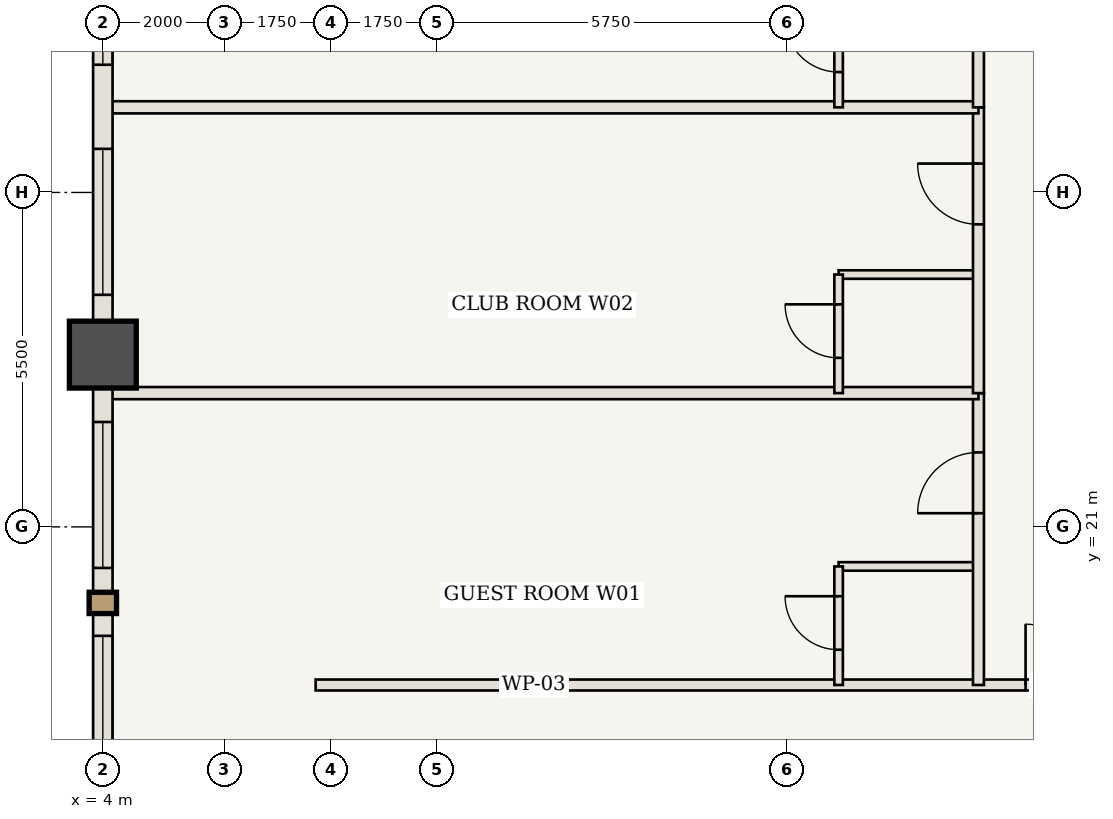
"""IFC4 building model, lengths in metres.
Left out: names, types, materials, properties, quantities, classifications, styles, units other than length and angle.
Written with IfcOpenShell. Run it as: python <this file> out.ifc"""

import sys

from ifc_helpers import new_model, si_unit, direction, frame, frame_2d, origin, origin_2d, place, context, subcontext, project, spatial, rectangle, extrude, element, fill, save


model = new_model("IFC4")
c1 = context("Model", 3, precision=1e-05, world=origin(), true_north=direction((0.0, 1.0)))
c2 = subcontext(c1, "Body", "Model", "MODEL_VIEW")
j1 = project(units=[si_unit("LENGTHUNIT", "METRE"), si_unit("PLANEANGLEUNIT", "RADIAN")], contexts=[c1])
p1 = place(None, origin())
s1 = spatial("IfcSite", under=j1, at=p1, CompositionType="ELEMENT")
p2 = place(p1, origin())
s2 = spatial("IfcBuilding", under=s1, at=p2, CompositionType="ELEMENT")
p3 = place(p2, frame((0.0, 0.0, 42.35)))
s3 = spatial("IfcBuildingStorey", under=s2, at=p3, CompositionType="ELEMENT", Elevation=42.35)
p4 = place(p3, frame((4.0, 23.833, 0.0), z_axis=(0.0, 0.0, 1.0), x_axis=(1.0, 0.0, 0.0)))
e1 = element("IfcColumn", 1, at=p4, inside=s3, PredefinedType="COLUMN", context=c2, shape_type="SweptSolid", body=[
    extrude(rectangle(XDim=1.1, YDim=1.1, at=origin_2d()), origin(), (0.0, 0.0, 1.0), 3.5),
])
p5 = place(p3, frame((7.5, 18.4, 0.0), z_axis=(0.0, 0.0, 1.0), x_axis=(1.0, 0.0, 0.0)))
e2 = element("IfcWall", 2, at=p5, inside=s3, PredefinedType="STANDARD", context=c2, shape_type="SweptSolid", body=[
    extrude(rectangle(XDim=16.3, YDim=0.18, at=frame_2d((8.15, 0.0))), origin(), (0.0, 0.0, 1.0), 3.32),
])
p6 = place(p5, frame((11.675, 0.0, 0.0)))
e3 = element("IfcOpeningElement", 3, at=p6, cuts=e2, PredefinedType="OPENING", context=c2, shape_type="SweptSolid", body=[
    extrude(rectangle(XDim=1.0, YDim=2.15, at=frame_2d((0.5, 1.075))), frame((0.0, 0.1, 0.0), z_axis=(0.0, -1.0, 0.0), x_axis=(1.0, 0.0, 0.0)), (0.0, 0.0, 1.0), 0.2),
])
p7 = place(p3, frame((16.1, 20.35, 0.0), z_axis=(0.0, 0.0, 1.0), x_axis=(1.0, 0.0, 0.0)))
e4 = element("IfcWall", 4, at=p7, inside=s3, PredefinedType="STANDARD", context=c2, shape_type="SweptSolid", body=[
    extrude(rectangle(XDim=2.3, YDim=0.14, at=frame_2d((1.15, 0.0))), origin(), (0.0, 0.0, 1.0), 3.32),
])
p8 = place(p3, frame((16.1, 18.4, 0.0), z_axis=(0.0, 0.0, 1.0), x_axis=(0.0, 1.0, 0.0)))
e5 = element("IfcWall", 5, at=p8, inside=s3, PredefinedType="STANDARD", context=c2, shape_type="SweptSolid", body=[
    extrude(rectangle(XDim=1.95, YDim=0.14, at=frame_2d((0.975, 0.0))), origin(), (0.0, 0.0, 1.0), 3.32),
])
p9 = place(p8, frame((0.58, 0.0, 0.0)))
e6 = element("IfcOpeningElement", 6, at=p9, cuts=e5, PredefinedType="OPENING", context=c2, shape_type="SweptSolid", body=[
    extrude(rectangle(XDim=0.88, YDim=2.1, at=frame_2d((0.44, 1.05))), frame((0.0, 0.08, 0.0), z_axis=(0.0, -1.0, 0.0), x_axis=(1.0, 0.0, 0.0)), (0.0, 0.0, 1.0), 0.16),
])
p10 = place(p3, frame((18.4, 18.4, 0.0), z_axis=(0.0, 0.0, 1.0), x_axis=(0.0, 1.0, 0.0)))
e7 = element("IfcWall", 7, at=p10, inside=s3, PredefinedType="STANDARD", context=c2, shape_type="SweptSolid", body=[
    extrude(rectangle(XDim=4.8, YDim=0.18, at=frame_2d((2.4, 0.0))), origin(), (0.0, 0.0, 1.0), 3.32),
])
p11 = place(p10, frame((2.825, 0.0, 0.0)))
e8 = element("IfcOpeningElement", 8, at=p11, cuts=e7, PredefinedType="OPENING", context=c2, shape_type="SweptSolid", body=[
    extrude(rectangle(XDim=1.0, YDim=2.15, at=frame_2d((0.5, 1.075))), frame((0.0, 0.1, 0.0), z_axis=(0.0, -1.0, 0.0), x_axis=(1.0, 0.0, 0.0)), (0.0, 0.0, 1.0), 0.2),
])
p12 = place(p3, frame((4.06, 23.2, 0.0), z_axis=(0.0, 0.0, 1.0), x_axis=(1.0, 0.0, 0.0)))
e9 = element("IfcWall", 9, at=p12, inside=s3, PredefinedType="STANDARD", context=c2, shape_type="SweptSolid", body=[
    extrude(rectangle(XDim=14.34, YDim=0.2, at=frame_2d((7.17, 0.0))), origin(), (0.0, 0.0, 1.0), 3.32),
])
p13 = place(p3, frame((16.1, 25.15, 0.0), z_axis=(0.0, 0.0, 1.0), x_axis=(1.0, 0.0, 0.0)))
e10 = element("IfcWall", 10, at=p13, inside=s3, PredefinedType="STANDARD", context=c2, shape_type="SweptSolid", body=[
    extrude(rectangle(XDim=2.3, YDim=0.14, at=frame_2d((1.15, 0.0))), origin(), (0.0, 0.0, 1.0), 3.32),
])
p14 = place(p3, frame((16.1, 23.2, 0.0), z_axis=(0.0, 0.0, 1.0), x_axis=(0.0, 1.0, 0.0)))
e11 = element("IfcWall", 11, at=p14, inside=s3, PredefinedType="STANDARD", context=c2, shape_type="SweptSolid", body=[
    extrude(rectangle(XDim=1.95, YDim=0.14, at=frame_2d((0.975, 0.0))), origin(), (0.0, 0.0, 1.0), 3.32),
])
p15 = place(p14, frame((0.58, 0.0, 0.0)))
e12 = element("IfcOpeningElement", 12, at=p15, cuts=e11, PredefinedType="OPENING", context=c2, shape_type="SweptSolid", body=[
    extrude(rectangle(XDim=0.88, YDim=2.1, at=frame_2d((0.44, 1.05))), frame((0.0, 0.08, 0.0), z_axis=(0.0, -1.0, 0.0), x_axis=(1.0, 0.0, 0.0)), (0.0, 0.0, 1.0), 0.16),
])
p16 = place(p3, frame((18.4, 23.2, 0.0), z_axis=(0.0, 0.0, 1.0), x_axis=(0.0, 1.0, 0.0)))
e13 = element("IfcWall", 13, at=p16, inside=s3, PredefinedType="STANDARD", context=c2, shape_type="SweptSolid", body=[
    extrude(rectangle(XDim=4.7, YDim=0.18, at=frame_2d((2.35, 0.0))), origin(), (0.0, 0.0, 1.0), 3.32),
])
p17 = place(p16, frame((2.775, 0.0, 0.0)))
e14 = element("IfcOpeningElement", 14, at=p17, cuts=e13, PredefinedType="OPENING", context=c2, shape_type="SweptSolid", body=[
    extrude(rectangle(XDim=1.0, YDim=2.15, at=frame_2d((0.5, 1.075))), frame((0.0, 0.1, 0.0), z_axis=(0.0, -1.0, 0.0), x_axis=(1.0, 0.0, 0.0)), (0.0, 0.0, 1.0), 0.2),
])
p18 = place(p3, frame((4.06, 27.9, 0.0), z_axis=(0.0, 0.0, 1.0), x_axis=(1.0, 0.0, 0.0)))
e15 = element("IfcWall", 15, at=p18, inside=s3, PredefinedType="STANDARD", context=c2, shape_type="SweptSolid", body=[
    extrude(rectangle(XDim=14.34, YDim=0.2, at=frame_2d((7.17, 0.0))), origin(), (0.0, 0.0, 1.0), 3.32),
])
p19 = place(p3, frame((16.1, 27.9, 0.0), z_axis=(0.0, 0.0, 1.0), x_axis=(0.0, 1.0, 0.0)))
e16 = element("IfcWall", 16, at=p19, inside=s3, PredefinedType="STANDARD", context=c2, shape_type="SweptSolid", body=[
    extrude(rectangle(XDim=1.95, YDim=0.14, at=frame_2d((0.975, 0.0))), origin(), (0.0, 0.0, 1.0), 3.32),
])
p20 = place(p19, frame((0.58, 0.0, 0.0)))
e17 = element("IfcOpeningElement", 17, at=p20, cuts=e16, PredefinedType="OPENING", context=c2, shape_type="SweptSolid", body=[
    extrude(rectangle(XDim=0.88, YDim=2.1, at=frame_2d((0.44, 1.05))), frame((0.0, 0.08, 0.0), z_axis=(0.0, -1.0, 0.0), x_axis=(1.0, 0.0, 0.0)), (0.0, 0.0, 1.0), 0.16),
])
p21 = place(p3, frame((18.4, 27.9, 0.0), z_axis=(0.0, 0.0, 1.0), x_axis=(0.0, 1.0, 0.0)))
e18 = element("IfcWall", 18, at=p21, inside=s3, PredefinedType="STANDARD", context=c2, shape_type="SweptSolid", body=[
    extrude(rectangle(XDim=4.7, YDim=0.18, at=frame_2d((2.35, 0.0))), origin(), (0.0, 0.0, 1.0), 3.32),
])
p22 = place(p21, frame((2.775, 0.0, 0.0)))
e19 = element("IfcOpeningElement", 19, at=p22, cuts=e18, PredefinedType="OPENING", context=c2, shape_type="SweptSolid", body=[
    extrude(rectangle(XDim=1.0, YDim=2.15, at=frame_2d((0.5, 1.075))), frame((0.0, 0.1, 0.0), z_axis=(0.0, -1.0, 0.0), x_axis=(1.0, 0.0, 0.0)), (0.0, 0.0, 1.0), 0.2),
])
p23 = place(p3, frame((4.0, 15.667, 0.0), z_axis=(0.0, 0.0, 1.0), x_axis=(0.0, 1.0, 0.0)))
e20 = element("IfcWall", 20, at=p23, inside=s3, PredefinedType="USERDEFINED", context=c2, shape_type="SweptSolid", body=[
    extrude(rectangle(XDim=8.167, YDim=0.32, at=frame_2d((4.083, 0.0))), origin(), (0.0, 0.0, 1.0), 2.52),
])
p24 = place(p23, frame((0.742, 0.0, 0.85)))
e21 = element("IfcOpeningElement", 21, at=p24, cuts=e20, PredefinedType="OPENING", context=c2, shape_type="SweptSolid", body=[
    extrude(rectangle(XDim=2.8, YDim=1.47, at=frame_2d((1.4, 0.735))), frame((0.0, 0.17, 0.0), z_axis=(0.0, -1.0, 0.0), x_axis=(1.0, 0.0, 0.0)), (0.0, 0.0, 1.0), 0.34),
])
p25 = place(p23, frame((4.658, 0.0, 0.85)))
e22 = element("IfcOpeningElement", 22, at=p25, cuts=e20, PredefinedType="OPENING", context=c2, shape_type="SweptSolid", body=[
    extrude(rectangle(XDim=2.4, YDim=1.47, at=frame_2d((1.2, 0.735))), frame((0.0, 0.17, 0.0), z_axis=(0.0, -1.0, 0.0), x_axis=(1.0, 0.0, 0.0)), (0.0, 0.0, 1.0), 0.34),
])
p26 = place(p3, frame((4.0, 23.833, 0.0), z_axis=(0.0, 0.0, 1.0), x_axis=(0.0, 1.0, 0.0)))
e23 = element("IfcWall", 23, at=p26, inside=s3, PredefinedType="USERDEFINED", context=c2, shape_type="SweptSolid", body=[
    extrude(rectangle(XDim=8.167, YDim=0.32, at=frame_2d((4.083, 0.0))), origin(), (0.0, 0.0, 1.0), 2.52),
])
p27 = place(p26, frame((0.983, 0.0, 0.85)))
e24 = element("IfcOpeningElement", 24, at=p27, cuts=e23, PredefinedType="OPENING", context=c2, shape_type="SweptSolid", body=[
    extrude(rectangle(XDim=2.4, YDim=1.47, at=frame_2d((1.2, 0.735))), frame((0.0, 0.17, 0.0), z_axis=(0.0, -1.0, 0.0), x_axis=(1.0, 0.0, 0.0)), (0.0, 0.0, 1.0), 0.34),
])
p28 = place(p26, frame((4.767, 0.0, 0.85)))
e25 = element("IfcOpeningElement", 25, at=p28, cuts=e23, PredefinedType="OPENING", context=c2, shape_type="SweptSolid", body=[
    extrude(rectangle(XDim=2.4, YDim=1.47, at=frame_2d((1.2, 0.735))), frame((0.0, 0.17, 0.0), z_axis=(0.0, -1.0, 0.0), x_axis=(1.0, 0.0, 0.0)), (0.0, 0.0, 1.0), 0.34),
])
p29 = place(p6, origin())
e26 = element("IfcDoor", 26, at=p29, inside=s3, OperationType="SINGLE_SWING_LEFT", PredefinedType="DOOR", context=c2, shape_type="SweptSolid", body=[
    extrude(rectangle(XDim=1.0, YDim=2.15, at=frame_2d((0.5, 1.075))), frame((0.0, 0.025, 0.0), z_axis=(0.0, -1.0, 0.0), x_axis=(1.0, 0.0, 0.0)), (0.0, 0.0, 1.0), 0.05),
])
fill(e3, e26)
p30 = place(p9, origin())
e27 = element("IfcDoor", 27, at=p30, inside=s3, OperationType="SINGLE_SWING_RIGHT", PredefinedType="DOOR", context=c2, shape_type="SweptSolid", body=[
    extrude(rectangle(XDim=0.88, YDim=2.1, at=frame_2d((0.44, 1.05))), frame((0.0, 0.025, 0.0), z_axis=(0.0, -1.0, 0.0), x_axis=(1.0, 0.0, 0.0)), (0.0, 0.0, 1.0), 0.05),
])
fill(e6, e27)
p31 = place(p11, origin())
e28 = element("IfcDoor", 28, at=p31, inside=s3, OperationType="SINGLE_SWING_LEFT", PredefinedType="DOOR", context=c2, shape_type="SweptSolid", body=[
    extrude(rectangle(XDim=1.0, YDim=2.15, at=frame_2d((0.5, 1.075))), frame((0.0, 0.025, 0.0), z_axis=(0.0, -1.0, 0.0), x_axis=(1.0, 0.0, 0.0)), (0.0, 0.0, 1.0), 0.05),
])
fill(e8, e28)
p32 = place(p15, origin())
e29 = element("IfcDoor", 29, at=p32, inside=s3, OperationType="SINGLE_SWING_RIGHT", PredefinedType="DOOR", context=c2, shape_type="SweptSolid", body=[
    extrude(rectangle(XDim=0.88, YDim=2.1, at=frame_2d((0.44, 1.05))), frame((0.0, 0.025, 0.0), z_axis=(0.0, -1.0, 0.0), x_axis=(1.0, 0.0, 0.0)), (0.0, 0.0, 1.0), 0.05),
])
fill(e12, e29)
p33 = place(p17, origin())
e30 = element("IfcDoor", 30, at=p33, inside=s3, OperationType="SINGLE_SWING_RIGHT", PredefinedType="DOOR", context=c2, shape_type="SweptSolid", body=[
    extrude(rectangle(XDim=1.0, YDim=2.15, at=frame_2d((0.5, 1.075))), frame((0.0, 0.025, 0.0), z_axis=(0.0, -1.0, 0.0), x_axis=(1.0, 0.0, 0.0)), (0.0, 0.0, 1.0), 0.05),
])
fill(e14, e30)
p34 = place(p20, origin())
e31 = element("IfcDoor", 31, at=p34, inside=s3, OperationType="SINGLE_SWING_RIGHT", PredefinedType="DOOR", context=c2, shape_type="SweptSolid", body=[
    extrude(rectangle(XDim=0.88, YDim=2.1, at=frame_2d((0.44, 1.05))), frame((0.0, 0.025, 0.0), z_axis=(0.0, -1.0, 0.0), x_axis=(1.0, 0.0, 0.0)), (0.0, 0.0, 1.0), 0.05),
])
fill(e17, e31)
p35 = place(p24, origin())
e32 = element("IfcWindow", 32, at=p35, inside=s3, PartitioningType="SINGLE_PANEL", PredefinedType="WINDOW", context=c2, shape_type="SweptSolid", body=[
    extrude(rectangle(XDim=2.8, YDim=1.47, at=frame_2d((1.4, 0.735))), frame((0.0, 0.03, 0.0), z_axis=(0.0, -1.0, 0.0), x_axis=(1.0, 0.0, 0.0)), (0.0, 0.0, 1.0), 0.06),
])
fill(e21, e32)
p36 = place(p25, origin())
e33 = element("IfcWindow", 33, at=p36, inside=s3, PartitioningType="SINGLE_PANEL", PredefinedType="WINDOW", context=c2, shape_type="SweptSolid", body=[
    extrude(rectangle(XDim=2.4, YDim=1.47, at=frame_2d((1.2, 0.735))), frame((0.0, 0.03, 0.0), z_axis=(0.0, -1.0, 0.0), x_axis=(1.0, 0.0, 0.0)), (0.0, 0.0, 1.0), 0.06),
])
fill(e22, e33)
p37 = place(p27, origin())
e34 = element("IfcWindow", 34, at=p37, inside=s3, PartitioningType="SINGLE_PANEL", PredefinedType="WINDOW", context=c2, shape_type="SweptSolid", body=[
    extrude(rectangle(XDim=2.4, YDim=1.47, at=frame_2d((1.2, 0.735))), frame((0.0, 0.03, 0.0), z_axis=(0.0, -1.0, 0.0), x_axis=(1.0, 0.0, 0.0)), (0.0, 0.0, 1.0), 0.06),
])
fill(e24, e34)
p38 = place(p28, origin())
e35 = element("IfcWindow", 35, at=p38, inside=s3, PartitioningType="SINGLE_PANEL", PredefinedType="WINDOW", context=c2, shape_type="SweptSolid", body=[
    extrude(rectangle(XDim=2.4, YDim=1.47, at=frame_2d((1.2, 0.735))), frame((0.0, 0.03, 0.0), z_axis=(0.0, -1.0, 0.0), x_axis=(1.0, 0.0, 0.0)), (0.0, 0.0, 1.0), 0.06),
])
fill(e25, e35)
save(model, sys.argv[1])
